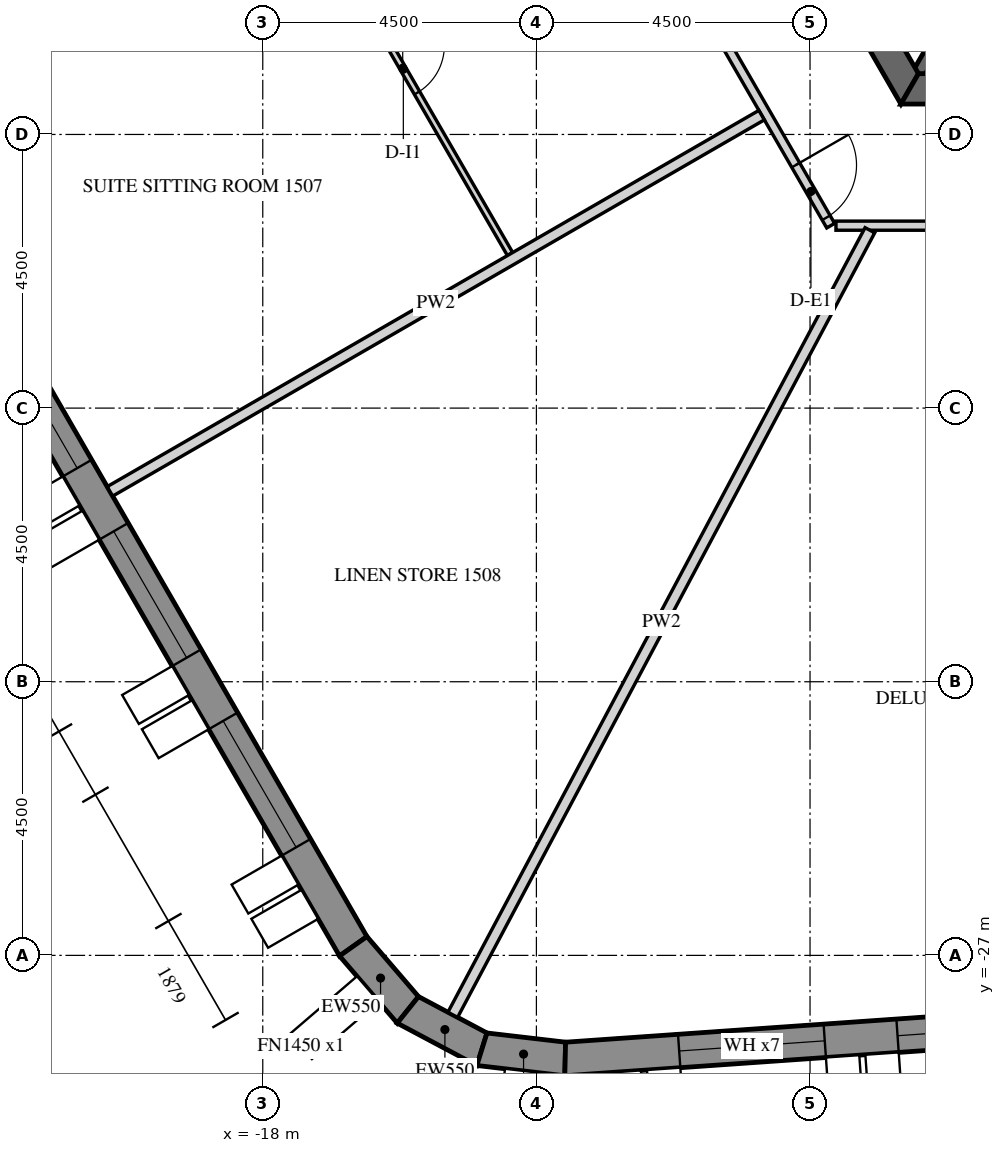
"""IFC4 building model, lengths in metres.
Left out: names, types, materials, properties, quantities, classifications, styles, units other than length and angle.
Written with IfcOpenShell. Run it as: python <this file> out.ifc"""

import sys

from ifc_helpers import new_model, si_unit, direction, frame, frame_2d, origin, place, context, subcontext, project, spatial, polyline, rectangle, outline, extrude, element, fill, save


model = new_model("IFC4")
c1 = context("Model", 3, precision=1e-05, world=origin(), true_north=direction((0.0, 1.0)))
c2 = subcontext(c1, "Body", "Model", "MODEL_VIEW")
j1 = project(units=[si_unit("LENGTHUNIT", "METRE"), si_unit("PLANEANGLEUNIT", "RADIAN")], contexts=[c1])
p1 = place(None, origin())
s1 = spatial("IfcSite", under=j1, at=p1, CompositionType="ELEMENT")
p2 = place(p1, origin())
s2 = spatial("IfcBuilding", under=s1, at=p2, CompositionType="ELEMENT")
p3 = place(p2, frame((0.0, 0.0, 195.6)))
s3 = spatial("IfcBuildingStorey", under=s2, at=p3, CompositionType="ELEMENT", Elevation=195.6)
p4 = place(p3, frame((-30.391, -2.811, -0.15), z_axis=(0.0, 0.0, 1.0), x_axis=(0.499998569178, -0.866026229868, 0.0)))
e1 = element("IfcWall", 1, at=p4, inside=s3, PredefinedType="SOLIDWALL", context=c2, shape_type="SweptSolid", body=[
    extrude(outline(polyline([(-0.022, -0.275), (27.783, -0.275), (27.732, 0.275), (0.022, 0.275), (-0.022, -0.275)])), origin(), (0.0, 0.0, 1.0), 3.9),
])
p5 = place(p4, frame((1.879, 0.0, 1.05)))
e2 = element("IfcOpeningElement", 2, at=p5, cuts=e1, PredefinedType="OPENING", context=c2, shape_type="SweptSolid", body=[
    extrude(rectangle(XDim=2.4, YDim=2.4, at=frame_2d((1.2, 1.2))), frame((0.0, 0.285, 0.0), z_axis=(0.0, -1.0, 0.0), x_axis=(1.0, 0.0, 0.0)), (0.0, 0.0, 1.0), 0.57),
])
p6 = place(p4, frame((5.479, 0.0, 1.05)))
e3 = element("IfcOpeningElement", 3, at=p6, cuts=e1, PredefinedType="OPENING", context=c2, shape_type="SweptSolid", body=[
    extrude(rectangle(XDim=2.4, YDim=2.4, at=frame_2d((1.2, 1.2))), frame((0.0, 0.285, 0.0), z_axis=(0.0, -1.0, 0.0), x_axis=(1.0, 0.0, 0.0)), (0.0, 0.0, 1.0), 0.57),
])
p7 = place(p4, frame((9.079, 0.0, 1.05)))
e4 = element("IfcOpeningElement", 4, at=p7, cuts=e1, PredefinedType="OPENING", context=c2, shape_type="SweptSolid", body=[
    extrude(rectangle(XDim=2.4, YDim=2.4, at=frame_2d((1.2, 1.2))), frame((0.0, 0.285, 0.0), z_axis=(0.0, -1.0, 0.0), x_axis=(1.0, 0.0, 0.0)), (0.0, 0.0, 1.0), 0.57),
])
p8 = place(p4, frame((12.679, 0.0, 1.05)))
e5 = element("IfcOpeningElement", 5, at=p8, cuts=e1, PredefinedType="OPENING", context=c2, shape_type="SweptSolid", body=[
    extrude(rectangle(XDim=2.4, YDim=2.4, at=frame_2d((1.2, 1.2))), frame((0.0, 0.285, 0.0), z_axis=(0.0, -1.0, 0.0), x_axis=(1.0, 0.0, 0.0)), (0.0, 0.0, 1.0), 0.57),
])
p9 = place(p4, frame((16.279, 0.0, 1.05)))
e6 = element("IfcOpeningElement", 6, at=p9, cuts=e1, PredefinedType="OPENING", context=c2, shape_type="SweptSolid", body=[
    extrude(rectangle(XDim=2.4, YDim=2.4, at=frame_2d((1.2, 1.2))), frame((0.0, 0.285, 0.0), z_axis=(0.0, -1.0, 0.0), x_axis=(1.0, 0.0, 0.0)), (0.0, 0.0, 1.0), 0.57),
])
p10 = place(p4, frame((19.879, 0.0, 1.05)))
e7 = element("IfcOpeningElement", 7, at=p10, cuts=e1, PredefinedType="OPENING", context=c2, shape_type="SweptSolid", body=[
    extrude(rectangle(XDim=2.4, YDim=2.4, at=frame_2d((1.2, 1.2))), frame((0.0, 0.285, 0.0), z_axis=(0.0, -1.0, 0.0), x_axis=(1.0, 0.0, 0.0)), (0.0, 0.0, 1.0), 0.57),
])
p11 = place(p4, frame((23.479, 0.0, 1.05)))
e8 = element("IfcOpeningElement", 8, at=p11, cuts=e1, PredefinedType="OPENING", context=c2, shape_type="SweptSolid", body=[
    extrude(rectangle(XDim=2.4, YDim=2.4, at=frame_2d((1.2, 1.2))), frame((0.0, 0.285, 0.0), z_axis=(0.0, -1.0, 0.0), x_axis=(1.0, 0.0, 0.0)), (0.0, 0.0, 1.0), 0.57),
])
p12 = place(p3, frame((-16.512, -26.85, -0.15), z_axis=(0.0, 0.0, 1.0), x_axis=(0.651621950847, -0.758543890078, 0.0)))
e9 = element("IfcWall", 9, at=p12, inside=s3, PredefinedType="SOLIDWALL", context=c2, shape_type="SweptSolid", body=[
    extrude(outline(polyline([(-0.026, -0.275), (1.431, -0.275), (1.327, 0.275), (0.026, 0.275), (-0.026, -0.275)])), origin(), (0.0, 0.0, 1.0), 3.9),
])
p13 = place(p3, frame((-15.614, -27.896, -0.15), z_axis=(0.0, 0.0, 1.0), x_axis=(0.882994189209, -0.469383917304, 0.0)))
e10 = element("IfcWall", 10, at=p13, inside=s3, PredefinedType="SOLIDWALL", context=c2, shape_type="SweptSolid", body=[
    extrude(outline(polyline([(-0.052, -0.275), (1.431, -0.275), (1.327, 0.275), (0.052, 0.275), (-0.052, -0.275)])), origin(), (0.0, 0.0, 1.0), 3.9),
])
p14 = place(p3, frame((-14.396, -28.543, -0.15), z_axis=(0.0, 0.0, 1.0), x_axis=(0.993232537394, -0.11614269956, 0.0)))
e11 = element("IfcWall", 11, at=p14, inside=s3, PredefinedType="SOLIDWALL", context=c2, shape_type="SweptSolid", body=[
    extrude(outline(polyline([(-0.052, -0.275), (1.405, -0.275), (1.353, 0.275), (0.052, 0.275), (-0.052, -0.275)])), origin(), (0.0, 0.0, 1.0), 3.9),
])
p15 = place(p3, frame((-13.026, -28.704, -0.15), z_axis=(0.0, 0.0, 1.0), x_axis=(0.99756406806, 0.069756219185, 0.0)))
e12 = element("IfcWall", 12, at=p15, inside=s3, PredefinedType="SOLIDWALL", context=c2, shape_type="SweptSolid", body=[
    extrude(outline(polyline([(-0.026, -0.275), (27.78, -0.275), (27.735, 0.275), (0.026, 0.275), (-0.026, -0.275)])), origin(), (0.0, 0.0, 1.0), 3.9),
])
p16 = place(p15, frame((1.879, 0.0, 1.05)))
e13 = element("IfcOpeningElement", 13, at=p16, cuts=e12, PredefinedType="OPENING", context=c2, shape_type="SweptSolid", body=[
    extrude(rectangle(XDim=2.4, YDim=2.4, at=frame_2d((1.2, 1.2))), frame((0.0, 0.285, 0.0), z_axis=(0.0, -1.0, 0.0), x_axis=(1.0, 0.0, 0.0)), (0.0, 0.0, 1.0), 0.57),
])
p17 = place(p15, frame((5.479, 0.0, 1.05)))
e14 = element("IfcOpeningElement", 14, at=p17, cuts=e12, PredefinedType="OPENING", context=c2, shape_type="SweptSolid", body=[
    extrude(rectangle(XDim=2.4, YDim=2.4, at=frame_2d((1.2, 1.2))), frame((0.0, 0.285, 0.0), z_axis=(0.0, -1.0, 0.0), x_axis=(1.0, 0.0, 0.0)), (0.0, 0.0, 1.0), 0.57),
])
p18 = place(p15, frame((9.079, 0.0, 1.05)))
e15 = element("IfcOpeningElement", 15, at=p18, cuts=e12, PredefinedType="OPENING", context=c2, shape_type="SweptSolid", body=[
    extrude(rectangle(XDim=2.4, YDim=2.4, at=frame_2d((1.2, 1.2))), frame((0.0, 0.285, 0.0), z_axis=(0.0, -1.0, 0.0), x_axis=(1.0, 0.0, 0.0)), (0.0, 0.0, 1.0), 0.57),
])
p19 = place(p15, frame((12.679, 0.0, 1.05)))
e16 = element("IfcOpeningElement", 16, at=p19, cuts=e12, PredefinedType="OPENING", context=c2, shape_type="SweptSolid", body=[
    extrude(rectangle(XDim=2.4, YDim=2.4, at=frame_2d((1.2, 1.2))), frame((0.0, 0.285, 0.0), z_axis=(0.0, -1.0, 0.0), x_axis=(1.0, 0.0, 0.0)), (0.0, 0.0, 1.0), 0.57),
])
p20 = place(p15, frame((16.279, 0.0, 1.05)))
e17 = element("IfcOpeningElement", 17, at=p20, cuts=e12, PredefinedType="OPENING", context=c2, shape_type="SweptSolid", body=[
    extrude(rectangle(XDim=2.4, YDim=2.4, at=frame_2d((1.2, 1.2))), frame((0.0, 0.285, 0.0), z_axis=(0.0, -1.0, 0.0), x_axis=(1.0, 0.0, 0.0)), (0.0, 0.0, 1.0), 0.57),
])
p21 = place(p15, frame((19.879, 0.0, 1.05)))
e18 = element("IfcOpeningElement", 18, at=p21, cuts=e12, PredefinedType="OPENING", context=c2, shape_type="SweptSolid", body=[
    extrude(rectangle(XDim=2.4, YDim=2.4, at=frame_2d((1.2, 1.2))), frame((0.0, 0.285, 0.0), z_axis=(0.0, -1.0, 0.0), x_axis=(1.0, 0.0, 0.0)), (0.0, 0.0, 1.0), 0.57),
])
p22 = place(p15, frame((23.479, 0.0, 1.05)))
e19 = element("IfcOpeningElement", 19, at=p22, cuts=e12, PredefinedType="OPENING", context=c2, shape_type="SweptSolid", body=[
    extrude(rectangle(XDim=2.4, YDim=2.4, at=frame_2d((1.2, 1.2))), frame((0.0, 0.285, 0.0), z_axis=(0.0, -1.0, 0.0), x_axis=(1.0, 0.0, 0.0)), (0.0, 0.0, 1.0), 0.57),
])
p23 = place(p3, frame((-14.722, 0.0, -0.15), z_axis=(0.0, 0.0, 1.0), x_axis=(0.50000571537, -0.866022103989, 0.0)))
e20 = element("IfcWall", 20, at=p23, inside=s3, PredefinedType="SHEAR", context=c2, shape_type="SweptSolid", body=[
    extrude(outline(polyline([(-0.144, -0.25), (14.867, -0.25), (14.578, 0.25), (0.144, 0.25), (-0.144, -0.25)])), origin(), (0.0, 0.0, 1.0), 3.9),
])
p24 = place(p23, frame((6.432, 0.0, 0.15)))
e21 = element("IfcOpeningElement", 21, at=p24, cuts=e20, PredefinedType="OPENING", context=c2, shape_type="SweptSolid", body=[
    extrude(rectangle(XDim=1.8, YDim=2.4, at=frame_2d((0.9, 1.2))), frame((0.0, 0.26, 0.0), z_axis=(0.0, -1.0, 0.0), x_axis=(1.0, 0.0, 0.0)), (0.0, 0.0, 1.0), 0.52),
])
p25 = place(p3, frame((-7.361, -12.75, -0.15), z_axis=(0.0, 0.0, 1.0), x_axis=(1.0, 0.0, 0.0)))
e22 = element("IfcWall", 22, at=p25, inside=s3, PredefinedType="SHEAR", context=c2, shape_type="SweptSolid", body=[
    extrude(outline(polyline([(-0.144, -0.25), (14.866, -0.25), (14.578, 0.25), (0.144, 0.25), (-0.144, -0.25)])), origin(), (0.0, 0.0, 1.0), 3.9),
])
p26 = place(p25, frame((6.761, 0.0, 0.15)))
e23 = element("IfcOpeningElement", 23, at=p26, cuts=e22, PredefinedType="OPENING", context=c2, shape_type="SweptSolid", body=[
    extrude(rectangle(XDim=1.2, YDim=2.4, at=frame_2d((0.6, 1.2))), frame((0.0, 0.26, 0.0), z_axis=(0.0, -1.0, 0.0), x_axis=(1.0, 0.0, 0.0)), (0.0, 0.0, 1.0), 0.52),
])
p27 = place(p3, frame((-5.773, -10.0, -0.15), z_axis=(0.0, 0.0, 1.0), x_axis=(-0.499995765644, -0.866027848477, 0.0)))
e24 = element("IfcWall", 24, at=p27, inside=s3, PredefinedType="SHEAR", context=c2, shape_type="SweptSolid", body=[
    extrude(rectangle(XDim=2.887, YDim=0.2, at=frame_2d((1.443, 0.0))), origin(), (0.0, 0.0, 1.0), 3.9),
])
p28 = place(p3, frame((-15.094, -3.856, 0.0), z_axis=(0.0, 0.0, 1.0), x_axis=(0.500006037985, -0.866021917724, 0.0)))
e25 = element("IfcWall", 25, at=p28, inside=s3, PredefinedType="PARTITIONING", context=c2, shape_type="SweptSolid", body=[
    extrude(rectangle(XDim=12.867, YDim=0.15, at=frame_2d((6.434, 0.0))), origin(), (0.0, 0.0, 1.0), 2.988),
])
p29 = place(p28, frame((6.025, 0.0, 0.0)))
e26 = element("IfcOpeningElement", 26, at=p29, cuts=e25, PredefinedType="OPENING", context=c2, shape_type="SweptSolid", body=[
    extrude(rectangle(XDim=1.0, YDim=2.1, at=frame_2d((0.5, 1.05))), frame((0.0, 0.085, 0.0), z_axis=(0.0, -1.0, 0.0), x_axis=(1.0, 0.0, 0.0)), (0.0, 0.0, 1.0), 0.17),
])
p30 = place(p28, frame((11.717, 0.0, 0.0)))
e27 = element("IfcOpeningElement", 27, at=p30, cuts=e25, PredefinedType="OPENING", context=c2, shape_type="SweptSolid", body=[
    extrude(rectangle(XDim=1.0, YDim=2.1, at=frame_2d((0.5, 1.05))), frame((0.0, 0.085, 0.0), z_axis=(0.0, -1.0, 0.0), x_axis=(1.0, 0.0, 0.0)), (0.0, 0.0, 1.0), 0.17),
])
p31 = place(p3, frame((-8.574, -15.0, 0.0), z_axis=(0.0, 0.0, 1.0), x_axis=(1.0, 0.0, 0.0)))
e28 = element("IfcWall", 28, at=p31, inside=s3, PredefinedType="PARTITIONING", context=c2, shape_type="SweptSolid", body=[
    extrude(rectangle(XDim=13.915, YDim=0.15, at=frame_2d((6.958, 0.0))), origin(), (0.0, 0.0, 1.0), 2.988),
])
p32 = place(p31, frame((1.951, 0.0, 0.0)))
e29 = element("IfcOpeningElement", 29, at=p32, cuts=e28, PredefinedType="OPENING", context=c2, shape_type="SweptSolid", body=[
    extrude(rectangle(XDim=1.0, YDim=2.1, at=frame_2d((0.5, 1.05))), frame((0.0, 0.085, 0.0), z_axis=(0.0, -1.0, 0.0), x_axis=(1.0, 0.0, 0.0)), (0.0, 0.0, 1.0), 0.17),
])
p33 = place(p31, frame((8.002, 0.0, 0.0)))
e30 = element("IfcOpeningElement", 30, at=p33, cuts=e28, PredefinedType="OPENING", context=c2, shape_type="SweptSolid", body=[
    extrude(rectangle(XDim=1.0, YDim=2.1, at=frame_2d((0.5, 1.05))), frame((0.0, 0.085, 0.0), z_axis=(0.0, -1.0, 0.0), x_axis=(1.0, 0.0, 0.0)), (0.0, 0.0, 1.0), 0.17),
])
p34 = place(p31, frame((11.611, 0.0, 0.0)))
e31 = element("IfcOpeningElement", 31, at=p34, cuts=e28, PredefinedType="OPENING", context=c2, shape_type="SweptSolid", body=[
    extrude(rectangle(XDim=1.0, YDim=2.1, at=frame_2d((0.5, 1.05))), frame((0.0, 0.085, 0.0), z_axis=(0.0, -1.0, 0.0), x_axis=(1.0, 0.0, 0.0)), (0.0, 0.0, 1.0), 0.17),
])
p35 = place(p3, frame((-24.114, -13.134, 0.0), z_axis=(0.0, 0.0, 1.0), x_axis=(0.866033062874, 0.499986733834, 0.0)))
e32 = element("IfcWall", 32, at=p35, inside=s3, PredefinedType="PARTITIONING", context=c2, shape_type="SweptSolid", body=[
    extrude(rectangle(XDim=7.65, YDim=0.1, at=frame_2d((3.825, 0.0))), origin(), (0.0, 0.0, 1.0), 2.988),
])
p36 = place(p3, frame((-17.463, -9.353, 0.0), z_axis=(0.0, 0.0, 1.0), x_axis=(0.499995846692, -0.866027801685, 0.0)))
e33 = element("IfcWall", 33, at=p36, inside=s3, PredefinedType="PARTITIONING", context=c2, shape_type="SweptSolid", body=[
    extrude(rectangle(XDim=7.06, YDim=0.1, at=frame_2d((3.53, 0.0))), origin(), (0.0, 0.0, 1.0), 2.988),
])
p37 = place(p36, frame((3.1, 0.0, 0.0)))
e34 = element("IfcOpeningElement", 34, at=p37, cuts=e33, PredefinedType="OPENING", context=c2, shape_type="SweptSolid", body=[
    extrude(rectangle(XDim=0.9, YDim=2.1, at=frame_2d((0.45, 1.05))), frame((0.0, 0.06, 0.0), z_axis=(0.0, -1.0, 0.0), x_axis=(1.0, 0.0, 0.0)), (0.0, 0.0, 1.0), 0.12),
])
p38 = place(p3, frame((-20.513, -19.37, 0.0), z_axis=(0.0, 0.0, 1.0), x_axis=(0.866024931941, 0.500000817256, 0.0)))
e35 = element("IfcWall", 35, at=p38, inside=s3, PredefinedType="PARTITIONING", context=c2, shape_type="SweptSolid", body=[
    extrude(rectangle(XDim=12.375, YDim=0.18, at=frame_2d((6.188, 0.0))), origin(), (0.0, 0.0, 1.0), 2.988),
])
p39 = place(p3, frame((-14.876, -27.977, 0.0), z_axis=(0.0, 0.0, 1.0), x_axis=(0.469468328163, 0.882949312731, 0.0)))
e36 = element("IfcWall", 36, at=p39, inside=s3, PredefinedType="PARTITIONING", context=c2, shape_type="SweptSolid", body=[
    extrude(rectangle(XDim=14.613, YDim=0.18, at=frame_2d((7.306, 0.0))), origin(), (0.0, 0.0, 1.0), 2.988),
])
p40 = place(p9, frame((0.0, 0.205, 0.0)))
e37 = element("IfcWindow", 37, at=p40, inside=s3, PartitioningType="DOUBLE_PANEL_VERTICAL", PredefinedType="WINDOW", context=c2, shape_type="SweptSolid", body=[
    extrude(rectangle(XDim=2.4, YDim=2.4, at=frame_2d((1.2, 1.2))), frame((0.0, 0.03, 0.0), z_axis=(0.0, -1.0, 0.0), x_axis=(1.0, 0.0, 0.0)), (0.0, 0.0, 1.0), 0.06),
])
fill(e6, e37)
p41 = place(p10, frame((0.0, 0.205, 0.0)))
e38 = element("IfcWindow", 38, at=p41, inside=s3, PartitioningType="DOUBLE_PANEL_VERTICAL", PredefinedType="WINDOW", context=c2, shape_type="SweptSolid", body=[
    extrude(rectangle(XDim=2.4, YDim=2.4, at=frame_2d((1.2, 1.2))), frame((0.0, 0.03, 0.0), z_axis=(0.0, -1.0, 0.0), x_axis=(1.0, 0.0, 0.0)), (0.0, 0.0, 1.0), 0.06),
])
fill(e7, e38)
p42 = place(p11, frame((0.0, 0.205, 0.0)))
e39 = element("IfcWindow", 39, at=p42, inside=s3, PartitioningType="DOUBLE_PANEL_VERTICAL", PredefinedType="WINDOW", context=c2, shape_type="SweptSolid", body=[
    extrude(rectangle(XDim=2.4, YDim=2.4, at=frame_2d((1.2, 1.2))), frame((0.0, 0.03, 0.0), z_axis=(0.0, -1.0, 0.0), x_axis=(1.0, 0.0, 0.0)), (0.0, 0.0, 1.0), 0.06),
])
fill(e8, e39)
p43 = place(p16, frame((0.0, 0.205, 0.0)))
e40 = element("IfcWindow", 40, at=p43, inside=s3, PartitioningType="DOUBLE_PANEL_VERTICAL", PredefinedType="WINDOW", context=c2, shape_type="SweptSolid", body=[
    extrude(rectangle(XDim=2.4, YDim=2.4, at=frame_2d((1.2, 1.2))), frame((0.0, 0.03, 0.0), z_axis=(0.0, -1.0, 0.0), x_axis=(1.0, 0.0, 0.0)), (0.0, 0.0, 1.0), 0.06),
])
fill(e13, e40)
p44 = place(p17, frame((0.0, 0.205, 0.0)))
e41 = element("IfcWindow", 41, at=p44, inside=s3, PartitioningType="DOUBLE_PANEL_VERTICAL", PredefinedType="WINDOW", context=c2, shape_type="SweptSolid", body=[
    extrude(rectangle(XDim=2.4, YDim=2.4, at=frame_2d((1.2, 1.2))), frame((0.0, 0.03, 0.0), z_axis=(0.0, -1.0, 0.0), x_axis=(1.0, 0.0, 0.0)), (0.0, 0.0, 1.0), 0.06),
])
fill(e14, e41)
p45 = place(p37, origin())
e42 = element("IfcDoor", 42, at=p45, inside=s3, OperationType="SINGLE_SWING_RIGHT", PredefinedType="DOOR", context=c2, shape_type="SweptSolid", body=[
    extrude(rectangle(XDim=0.9, YDim=2.1, at=frame_2d((0.45, 1.05))), frame((0.0, 0.025, 0.0), z_axis=(0.0, -1.0, 0.0), x_axis=(1.0, 0.0, 0.0)), (0.0, 0.0, 1.0), 0.05),
])
fill(e34, e42)
p46 = place(p30, origin())
e43 = element("IfcDoor", 43, at=p46, inside=s3, OperationType="SINGLE_SWING_LEFT", PredefinedType="DOOR", context=c2, shape_type="SweptSolid", body=[
    extrude(rectangle(XDim=1.0, YDim=2.1, at=frame_2d((0.5, 1.05))), frame((0.0, 0.025, 0.0), z_axis=(0.0, -1.0, 0.0), x_axis=(1.0, 0.0, 0.0)), (0.0, 0.0, 1.0), 0.05),
])
fill(e27, e43)
save(model, sys.argv[1])
